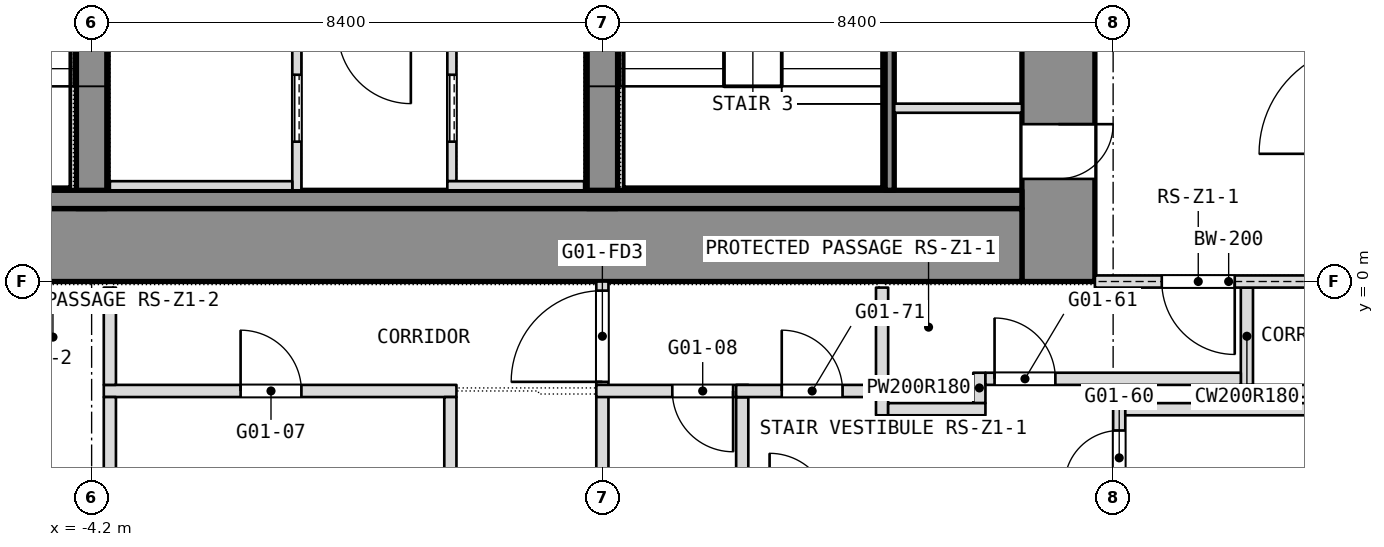
"""IFC4 building model, lengths in metres.
Left out: names, types, materials, properties, quantities, classifications, styles, units other than length and angle.
Written with IfcOpenShell. Run it as: python <this file> out.ifc"""

import sys

from ifc_helpers import new_model, si_unit, direction, frame, frame_2d, origin, place, context, subcontext, project, spatial, rectangle, extrude, element, fill, save


model = new_model("IFC4")
c1 = context("Model", 3, precision=1e-05, world=origin(), true_north=direction((0.0, 1.0)))
c2 = subcontext(c1, "Body", "Model", "MODEL_VIEW")
j1 = project(units=[si_unit("LENGTHUNIT", "METRE"), si_unit("PLANEANGLEUNIT", "RADIAN")], contexts=[c1])
p1 = place(None, origin())
s1 = spatial("IfcSite", under=j1, at=p1, CompositionType="ELEMENT")
p2 = place(p1, origin())
s2 = spatial("IfcBuilding", under=s1, at=p2, CompositionType="ELEMENT")
p3 = place(p2, frame((0.0, 0.0, 36.5)))
s3 = spatial("IfcBuildingStorey", under=s2, at=p3, CompositionType="ELEMENT", Elevation=36.5)
p4 = place(p3, frame((11.7, 0.0, 0.0), z_axis=(0.0, 0.0, 1.0), x_axis=(0.0, 1.0, 0.0)))
e1 = element("IfcWall", 1, at=p4, inside=s3, PredefinedType="SHEAR", context=c2, shape_type="SweptSolid", body=[
    extrude(rectangle(XDim=16.8, YDim=1.2, at=frame_2d((8.4, 0.0))), origin(), (0.0, 0.0, 1.0), 3.6),
])
p5 = place(p4, frame((1.688, 0.0, 0.0)))
e2 = element("IfcOpeningElement", 2, at=p5, cuts=e1, PredefinedType="OPENING", context=c2, shape_type="SweptSolid", body=[
    extrude(rectangle(XDim=0.9, YDim=2.1, at=frame_2d((0.45, 1.05))), frame((0.0, 0.6, 0.0), z_axis=(0.0, -1.0, 0.0), x_axis=(1.0, 0.0, 0.0)), (0.0, 0.0, 1.0), 1.2),
])
p6 = place(p4, frame((4.312, 0.0, 0.0)))
e3 = element("IfcOpeningElement", 3, at=p6, cuts=e1, PredefinedType="OPENING", context=c2, shape_type="SweptSolid", body=[
    extrude(rectangle(XDim=0.9, YDim=2.1, at=frame_2d((0.45, 1.05))), frame((0.0, 0.6, 0.0), z_axis=(0.0, -1.0, 0.0), x_axis=(1.0, 0.0, 0.0)), (0.0, 0.0, 1.0), 1.2),
])
p7 = place(p4, frame((6.825, 0.0, 0.0)))
e4 = element("IfcOpeningElement", 4, at=p7, cuts=e1, PredefinedType="OPENING", context=c2, shape_type="SweptSolid", body=[
    extrude(rectangle(XDim=1.2, YDim=2.1, at=frame_2d((0.6, 1.05))), frame((0.0, 0.6, 0.0), z_axis=(0.0, -1.0, 0.0), x_axis=(1.0, 0.0, 0.0)), (0.0, 0.0, 1.0), 1.2),
])
p8 = place(p4, frame((14.212, 0.0, 0.0)))
e5 = element("IfcOpeningElement", 5, at=p8, cuts=e1, PredefinedType="OPENING", context=c2, shape_type="SweptSolid", body=[
    extrude(rectangle(XDim=0.9, YDim=2.1, at=frame_2d((0.45, 1.05))), frame((0.0, 0.6, 0.0), z_axis=(0.0, -1.0, 0.0), x_axis=(1.0, 0.0, 0.0)), (0.0, 0.0, 1.0), 1.2),
])
p9 = place(p4, frame((11.587, 0.0, 0.0)))
e6 = element("IfcOpeningElement", 6, at=p9, cuts=e1, PredefinedType="OPENING", context=c2, shape_type="SweptSolid", body=[
    extrude(rectangle(XDim=0.9, YDim=2.1, at=frame_2d((0.45, 1.05))), frame((0.0, 0.6, 0.0), z_axis=(0.0, -1.0, 0.0), x_axis=(1.0, 0.0, 0.0)), (0.0, 0.0, 1.0), 1.2),
])
p10 = place(p4, frame((8.775, 0.0, 0.0)))
e7 = element("IfcOpeningElement", 7, at=p10, cuts=e1, PredefinedType="OPENING", context=c2, shape_type="SweptSolid", body=[
    extrude(rectangle(XDim=1.2, YDim=2.1, at=frame_2d((0.6, 1.05))), frame((0.0, 0.6, 0.0), z_axis=(0.0, -1.0, 0.0), x_axis=(1.0, 0.0, 0.0)), (0.0, 0.0, 1.0), 1.2),
])
p11 = place(p3, frame((-11.1, 0.6, 0.0), z_axis=(0.0, 0.0, 1.0), x_axis=(1.0, 0.0, 0.0)))
e8 = element("IfcWall", 8, at=p11, inside=s3, PredefinedType="SHEAR", context=c2, shape_type="SweptSolid", body=[
    extrude(rectangle(XDim=22.2, YDim=1.2, at=frame_2d((11.1, 0.0))), origin(), (0.0, 0.0, 1.0), 3.6),
])
p12 = place(p3, frame((-4.2, 1.2, 0.0), z_axis=(0.0, 0.0, 1.0), x_axis=(0.0, 1.0, 0.0)))
e9 = element("IfcWall", 9, at=p12, inside=s3, PredefinedType="SHEAR", context=c2, shape_type="SweptSolid", body=[
    extrude(rectangle(XDim=14.4, YDim=0.5, at=frame_2d((7.2, 0.0))), origin(), (0.0, 0.0, 1.0), 3.6),
])
p13 = place(p12, frame((8.1, 0.0, 0.0)))
e10 = element("IfcOpeningElement", 10, at=p13, cuts=e9, PredefinedType="OPENING", context=c2, shape_type="SweptSolid", body=[
    extrude(rectangle(XDim=1.2, YDim=2.1, at=frame_2d((0.6, 1.05))), frame((0.0, 0.25, 0.0), z_axis=(0.0, -1.0, 0.0), x_axis=(1.0, 0.0, 0.0)), (0.0, 0.0, 1.0), 0.5),
])
p14 = place(p3, frame((4.2, 1.2, 0.0), z_axis=(0.0, 0.0, 1.0), x_axis=(0.0, 1.0, 0.0)))
e11 = element("IfcWall", 11, at=p14, inside=s3, PredefinedType="SHEAR", context=c2, shape_type="SweptSolid", body=[
    extrude(rectangle(XDim=14.4, YDim=0.5, at=frame_2d((7.2, 0.0))), origin(), (0.0, 0.0, 1.0), 3.6),
])
p15 = place(p14, frame((5.55, 0.0, 0.0)))
e12 = element("IfcOpeningElement", 12, at=p15, cuts=e11, PredefinedType="OPENING", context=c2, shape_type="SweptSolid", body=[
    extrude(rectangle(XDim=1.2, YDim=2.1, at=frame_2d((0.6, 1.05))), frame((0.0, 0.25, 0.0), z_axis=(0.0, -1.0, 0.0), x_axis=(1.0, 0.0, 0.0)), (0.0, 0.0, 1.0), 0.5),
])
p16 = place(p3, frame((14.8, -1.7, 0.0), z_axis=(0.0, 0.0, 1.0), x_axis=(0.0, 1.0, 0.0)))
e13 = element("IfcWall", 13, at=p16, inside=s3, PredefinedType="PARTITIONING", context=c2, shape_type="SweptSolid", body=[
    extrude(rectangle(XDim=1.6, YDim=0.2, at=frame_2d((0.8, 0.0))), origin(), (0.0, 0.0, 1.0), 3.34),
])
p17 = place(p3, frame((12.7, -3.7, 0.0), z_axis=(0.0, 0.0, 1.0), x_axis=(0.0, 1.0, 0.0)))
e14 = element("IfcWall", 14, at=p17, inside=s3, PredefinedType="PARTITIONING", context=c2, shape_type="SweptSolid", body=[
    extrude(rectangle(XDim=1.7, YDim=0.2, at=frame_2d((0.85, 0.0))), origin(), (0.0, 0.0, 1.0), 3.34),
])
p18 = place(p17, frame((0.35, 0.0, 0.0)))
e15 = element("IfcOpeningElement", 15, at=p18, cuts=e14, PredefinedType="OPENING", context=c2, shape_type="SweptSolid", body=[
    extrude(rectangle(XDim=0.9, YDim=2.1, at=frame_2d((0.45, 1.05))), frame((0.0, 0.1, 0.0), z_axis=(0.0, -1.0, 0.0), x_axis=(1.0, 0.0, 0.0)), (0.0, 0.0, 1.0), 0.2),
])
p19 = place(p3, frame((10.4, -2.0, 0.0), z_axis=(0.0, 0.0, 1.0), x_axis=(0.0, 1.0, 0.0)))
e16 = element("IfcWall", 16, at=p19, inside=s3, PredefinedType="PARTITIONING", context=c2, shape_type="SweptSolid", body=[
    extrude(rectangle(XDim=0.5, YDim=0.2, at=frame_2d((0.25, 0.0))), origin(), (0.0, 0.0, 1.0), 3.34),
])
p20 = place(p3, frame((8.8, -2.2, 0.0), z_axis=(0.0, 0.0, 1.0), x_axis=(0.0, 1.0, 0.0)))
e17 = element("IfcWall", 17, at=p20, inside=s3, PredefinedType="PARTITIONING", context=c2, shape_type="SweptSolid", body=[
    extrude(rectangle(XDim=0.3, YDim=0.2, at=frame_2d((0.15, 0.0))), origin(), (0.0, 0.0, 1.0), 3.34),
])
p21 = place(p3, frame((8.8, -1.7, 0.0), z_axis=(0.0, 0.0, 1.0), x_axis=(0.0, 1.0, 0.0)))
e18 = element("IfcWall", 18, at=p21, inside=s3, PredefinedType="PARTITIONING", context=c2, shape_type="SweptSolid", body=[
    extrude(rectangle(XDim=1.6, YDim=0.2, at=frame_2d((0.8, 0.0))), origin(), (0.0, 0.0, 1.0), 3.34),
])
p22 = place(p3, frame((6.5, -3.7, 0.0), z_axis=(0.0, 0.0, 1.0), x_axis=(0.0, 1.0, 0.0)))
e19 = element("IfcWall", 19, at=p22, inside=s3, PredefinedType="PARTITIONING", context=c2, shape_type="SweptSolid", body=[
    extrude(rectangle(XDim=1.8, YDim=0.2, at=frame_2d((0.9, 0.0))), origin(), (0.0, 0.0, 1.0), 3.34),
])
p23 = place(p3, frame((4.2, -12.7, 0.0), z_axis=(0.0, 0.0, 1.0), x_axis=(0.0, 1.0, 0.0)))
e20 = element("IfcWall", 20, at=p23, inside=s3, PredefinedType="PARTITIONING", context=c2, shape_type="SweptSolid", body=[
    extrude(rectangle(XDim=12.7, YDim=0.2, at=frame_2d((6.35, 0.0))), origin(), (0.0, 0.0, 1.0), 3.34),
])
p24 = place(p23, frame((11.05, 0.0, 0.0)))
e21 = element("IfcOpeningElement", 21, at=p24, cuts=e20, PredefinedType="OPENING", context=c2, shape_type="SweptSolid", body=[
    extrude(rectangle(XDim=1.5, YDim=2.1, at=frame_2d((0.75, 1.05))), frame((0.0, 0.1, 0.0), z_axis=(0.0, -1.0, 0.0), x_axis=(1.0, 0.0, 0.0)), (0.0, 0.0, 1.0), 0.2),
])
p25 = place(p23, frame((0.225, 0.0, 0.0)))
e22 = element("IfcOpeningElement", 22, at=p25, cuts=e20, PredefinedType="OPENING", context=c2, shape_type="SweptSolid", body=[
    extrude(rectangle(XDim=1.5, YDim=2.1, at=frame_2d((0.75, 1.05))), frame((0.0, 0.1, 0.0), z_axis=(0.0, -1.0, 0.0), x_axis=(1.0, 0.0, 0.0)), (0.0, 0.0, 1.0), 0.2),
])
p26 = place(p3, frame((8.9, -2.1, 0.0), z_axis=(0.0, 0.0, 1.0), x_axis=(1.0, 0.0, 0.0)))
e23 = element("IfcWall", 23, at=p26, inside=s3, PredefinedType="PARTITIONING", context=c2, shape_type="SweptSolid", body=[
    extrude(rectangle(XDim=1.6, YDim=0.2, at=frame_2d((0.8, 0.0))), origin(), (0.0, 0.0, 1.0), 3.34),
])
p27 = place(p3, frame((12.8, -2.1, 0.0), z_axis=(0.0, 0.0, 1.0), x_axis=(1.0, 0.0, 0.0)))
e24 = element("IfcWall", 24, at=p27, inside=s3, PredefinedType="PARTITIONING", context=c2, shape_type="SweptSolid", body=[
    extrude(rectangle(XDim=4.1, YDim=0.2, at=frame_2d((2.05, 0.0))), origin(), (0.0, 0.0, 1.0), 3.34),
])
p28 = place(p3, frame((-4.0, -1.8, 0.0), z_axis=(0.0, 0.0, 1.0), x_axis=(1.0, 0.0, 0.0)))
e25 = element("IfcWall", 25, at=p28, inside=s3, PredefinedType="PARTITIONING", context=c2, shape_type="SweptSolid", body=[
    extrude(rectangle(XDim=5.8, YDim=0.2, at=frame_2d((2.9, 0.0))), origin(), (0.0, 0.0, 1.0), 3.34),
])
p29 = place(p28, frame((2.25, 0.0, 0.0)))
e26 = element("IfcOpeningElement", 26, at=p29, cuts=e25, PredefinedType="OPENING", context=c2, shape_type="SweptSolid", body=[
    extrude(rectangle(XDim=1.0, YDim=2.1, at=frame_2d((0.5, 1.05))), frame((0.0, 0.1, 0.0), z_axis=(0.0, -1.0, 0.0), x_axis=(1.0, 0.0, 0.0)), (0.0, 0.0, 1.0), 0.2),
])
p30 = place(p3, frame((4.1, -1.8, 0.0), z_axis=(0.0, 0.0, 1.0), x_axis=(1.0, 0.0, 0.0)))
e27 = element("IfcWall", 27, at=p30, inside=s3, PredefinedType="PARTITIONING", context=c2, shape_type="SweptSolid", body=[
    extrude(rectangle(XDim=2.5, YDim=0.2, at=frame_2d((1.25, 0.0))), origin(), (0.0, 0.0, 1.0), 3.34),
])
p31 = place(p30, frame((1.25, 0.0, 0.0)))
e28 = element("IfcOpeningElement", 28, at=p31, cuts=e27, PredefinedType="OPENING", context=c2, shape_type="SweptSolid", body=[
    extrude(rectangle(XDim=1.0, YDim=2.1, at=frame_2d((0.5, 1.05))), frame((0.0, 0.1, 0.0), z_axis=(0.0, -1.0, 0.0), x_axis=(1.0, 0.0, 0.0)), (0.0, 0.0, 1.0), 0.2),
])
p32 = place(p3, frame((6.4, -1.8, 0.0), z_axis=(0.0, 0.0, 1.0), x_axis=(1.0, 0.0, 0.0)))
e29 = element("IfcWall", 29, at=p32, inside=s3, PredefinedType="PARTITIONING", context=c2, shape_type="SweptSolid", body=[
    extrude(rectangle(XDim=2.5, YDim=0.2, at=frame_2d((1.25, 0.0))), origin(), (0.0, 0.0, 1.0), 3.34),
])
p33 = place(p32, frame((0.75, 0.0, 0.0)))
e30 = element("IfcOpeningElement", 30, at=p33, cuts=e29, PredefinedType="OPENING", context=c2, shape_type="SweptSolid", body=[
    extrude(rectangle(XDim=1.0, YDim=2.1, at=frame_2d((0.5, 1.05))), frame((0.0, 0.1, 0.0), z_axis=(0.0, -1.0, 0.0), x_axis=(1.0, 0.0, 0.0)), (0.0, 0.0, 1.0), 0.2),
])
p34 = place(p3, frame((14.8, -1.8, 0.0), z_axis=(0.0, 0.0, 1.0), x_axis=(1.0, 0.0, 0.0)))
e31 = element("IfcWall", 31, at=p34, inside=s3, PredefinedType="PARTITIONING", context=c2, shape_type="SweptSolid", body=[
    extrude(rectangle(XDim=2.1, YDim=0.2, at=frame_2d((1.05, 0.0))), origin(), (0.0, 0.0, 1.0), 3.34),
])
p35 = place(p3, frame((1.7, -10.7, 0.0), z_axis=(0.0, 0.0, 1.0), x_axis=(0.0, 1.0, 0.0)))
e32 = element("IfcWall", 32, at=p35, inside=s3, PredefinedType="PARTITIONING", context=c2, shape_type="SweptSolid", body=[
    extrude(rectangle(XDim=8.8, YDim=0.2, at=frame_2d((4.4, 0.0))), origin(), (0.0, 0.0, 1.0), 3.34),
])
p36 = place(p3, frame((10.5, -1.6, 0.0), z_axis=(0.0, 0.0, 1.0), x_axis=(1.0, 0.0, 0.0)))
e33 = element("IfcWall", 33, at=p36, inside=s3, PredefinedType="PARTITIONING", context=c2, shape_type="SweptSolid", body=[
    extrude(rectangle(XDim=4.2, YDim=0.2, at=frame_2d((2.1, 0.0))), origin(), (0.0, 0.0, 1.0), 3.34),
])
p37 = place(p36, frame((0.15, 0.0, 0.0)))
e34 = element("IfcOpeningElement", 34, at=p37, cuts=e33, PredefinedType="OPENING", context=c2, shape_type="SweptSolid", body=[
    extrude(rectangle(XDim=1.0, YDim=2.1, at=frame_2d((0.5, 1.05))), frame((0.0, 0.1, 0.0), z_axis=(0.0, -1.0, 0.0), x_axis=(1.0, 0.0, 0.0)), (0.0, 0.0, 1.0), 0.2),
])
p38 = place(p3, frame((-3.9, -3.5, 0.0), z_axis=(0.0, 0.0, 1.0), x_axis=(0.0, 1.0, 0.0)))
e35 = element("IfcWall", 35, at=p38, inside=s3, PredefinedType="PARTITIONING", context=c2, shape_type="SweptSolid", body=[
    extrude(rectangle(XDim=1.6, YDim=0.2, at=frame_2d((0.8, 0.0))), origin(), (0.0, 0.0, 1.0), 3.34),
])
p39 = place(p3, frame((-3.9, -1.7, 0.0), z_axis=(0.0, 0.0, 1.0), x_axis=(0.0, 1.0, 0.0)))
e36 = element("IfcWall", 36, at=p39, inside=s3, PredefinedType="PARTITIONING", context=c2, shape_type="SweptSolid", body=[
    extrude(rectangle(XDim=1.6, YDim=0.2, at=frame_2d((0.8, 0.0))), origin(), (0.0, 0.0, 1.0), 3.34),
])
p40 = place(p3, frame((-11.1, 1.35, 0.0), z_axis=(0.0, 0.0, 1.0), x_axis=(1.0, 0.0, 0.0)))
e37 = element("IfcWall", 37, at=p40, inside=s3, PredefinedType="PARTITIONING", context=c2, shape_type="SweptSolid", body=[
    extrude(rectangle(XDim=22.2, YDim=0.3, at=frame_2d((11.1, 0.0))), origin(), (0.0, 0.0, 1.0), 3.34),
])
p41 = place(p3, frame((8.925, 1.5, 0.0), z_axis=(0.0, 0.0, 1.0), x_axis=(0.0, 1.0, 0.0)))
e38 = element("IfcWall", 38, at=p41, inside=s3, PredefinedType="SHEAR", context=c2, shape_type="SweptSolid", body=[
    extrude(rectangle(XDim=6.6, YDim=0.15, at=frame_2d((3.3, 0.0))), origin(), (0.0, 0.0, 1.0), 3.34),
])
p42 = place(p41, frame((5.325, 0.0, 0.0)))
e39 = element("IfcOpeningElement", 39, at=p42, cuts=e38, PredefinedType="OPENING", context=c2, shape_type="SweptSolid", body=[
    extrude(rectangle(XDim=1.2, YDim=2.1, at=frame_2d((0.6, 1.05))), frame((0.0, 0.075, 0.0), z_axis=(0.0, -1.0, 0.0), x_axis=(1.0, 0.0, 0.0)), (0.0, 0.0, 1.0), 0.15),
])
p43 = place(p3, frame((9.0, 2.85, 0.0), z_axis=(0.0, 0.0, 1.0), x_axis=(1.0, 0.0, 0.0)))
e40 = element("IfcWall", 40, at=p43, inside=s3, PredefinedType="PARTITIONING", context=c2, shape_type="SweptSolid", body=[
    extrude(rectangle(XDim=2.1, YDim=0.15, at=frame_2d((1.05, 0.0))), origin(), (0.0, 0.0, 1.0), 3.34),
])
p44 = place(p3, frame((-0.825, 1.5, 0.0), z_axis=(0.0, 0.0, 1.0), x_axis=(0.0, 1.0, 0.0)))
e41 = element("IfcWall", 41, at=p44, inside=s3, PredefinedType="SHEAR", context=c2, shape_type="SweptSolid", body=[
    extrude(rectangle(XDim=2.55, YDim=0.15, at=frame_2d((1.275, 0.0))), origin(), (0.0, 0.0, 1.0), 3.6),
])
p45 = place(p44, frame((0.8, 0.0, 0.0)))
e42 = element("IfcOpeningElement", 42, at=p45, cuts=e41, PredefinedType="OPENING", context=c2, shape_type="SweptSolid", body=[
    extrude(rectangle(XDim=1.1, YDim=2.1, at=frame_2d((0.55, 1.05))), frame((0.0, 0.075, 0.0), z_axis=(0.0, -1.0, 0.0), x_axis=(1.0, 0.0, 0.0)), (0.0, 0.0, 1.0), 0.15),
])
p46 = place(p3, frame((-3.9, 1.575, 0.0), z_axis=(0.0, 0.0, 1.0), x_axis=(1.0, 0.0, 0.0)))
e43 = element("IfcWall", 43, at=p46, inside=s3, PredefinedType="SHEAR", context=c2, shape_type="SweptSolid", body=[
    extrude(rectangle(XDim=3.0, YDim=0.15, at=frame_2d((1.5, 0.0))), origin(), (0.0, 0.0, 1.0), 3.6),
])
p47 = place(p3, frame((1.725, 1.65, 0.0), z_axis=(0.0, 0.0, 1.0), x_axis=(0.0, 1.0, 0.0)))
e44 = element("IfcWall", 44, at=p47, inside=s3, PredefinedType="SHEAR", context=c2, shape_type="SweptSolid", body=[
    extrude(rectangle(XDim=2.4, YDim=0.15, at=frame_2d((1.2, 0.0))), origin(), (0.0, 0.0, 1.0), 3.6),
])
p48 = place(p47, frame((0.65, 0.0, 0.0)))
e45 = element("IfcOpeningElement", 45, at=p48, cuts=e44, PredefinedType="OPENING", context=c2, shape_type="SweptSolid", body=[
    extrude(rectangle(XDim=1.1, YDim=2.1, at=frame_2d((0.55, 1.05))), frame((0.0, 0.075, 0.0), z_axis=(0.0, -1.0, 0.0), x_axis=(1.0, 0.0, 0.0)), (0.0, 0.0, 1.0), 0.15),
])
p49 = place(p3, frame((1.65, 1.575, 0.0), z_axis=(0.0, 0.0, 1.0), x_axis=(1.0, 0.0, 0.0)))
e46 = element("IfcWall", 46, at=p49, inside=s3, PredefinedType="SHEAR", context=c2, shape_type="SweptSolid", body=[
    extrude(rectangle(XDim=2.25, YDim=0.15, at=frame_2d((1.125, 0.0))), origin(), (0.0, 0.0, 1.0), 3.6),
])
p50 = place(p3, frame((12.3, 0.0, 0.0), z_axis=(0.0, 0.0, 1.0), x_axis=(1.0, 0.0, 0.0)))
e47 = element("IfcWall", 47, at=p50, inside=s3, PredefinedType="PARTITIONING", context=c2, shape_type="SweptSolid", body=[
    extrude(rectangle(XDim=4.4, YDim=0.2, at=frame_2d((2.2, 0.0))), origin(), (0.0, 0.0, 1.0), 2.84),
])
p51 = place(p50, frame((1.1, 0.0, 0.0)))
e48 = element("IfcOpeningElement", 48, at=p51, cuts=e47, PredefinedType="OPENING", context=c2, shape_type="SweptSolid", body=[
    extrude(rectangle(XDim=1.2, YDim=2.1, at=frame_2d((0.6, 1.05))), frame((0.0, 0.1, 0.0), z_axis=(0.0, -1.0, 0.0), x_axis=(1.0, 0.0, 0.0)), (0.0, 0.0, 1.0), 0.2),
])
p52 = place(p18, origin())
e49 = element("IfcDoor", 49, at=p52, inside=s3, OperationType="SINGLE_SWING_LEFT", PredefinedType="DOOR", context=c2, shape_type="SweptSolid", body=[
    extrude(rectangle(XDim=0.9, YDim=2.1, at=frame_2d((0.45, 1.05))), frame((0.0, 0.025, 0.0), z_axis=(0.0, -1.0, 0.0), x_axis=(1.0, 0.0, 0.0)), (0.0, 0.0, 1.0), 0.05),
])
fill(e15, e49)
p53 = place(p29, origin())
e50 = element("IfcDoor", 50, at=p53, inside=s3, OperationType="SINGLE_SWING_LEFT", PredefinedType="DOOR", context=c2, shape_type="SweptSolid", body=[
    extrude(rectangle(XDim=1.0, YDim=2.1, at=frame_2d((0.5, 1.05))), frame((0.0, 0.025, 0.0), z_axis=(0.0, -1.0, 0.0), x_axis=(1.0, 0.0, 0.0)), (0.0, 0.0, 1.0), 0.05),
])
fill(e26, e50)
p54 = place(p31, origin())
e51 = element("IfcDoor", 51, at=p54, inside=s3, OperationType="SINGLE_SWING_RIGHT", PredefinedType="DOOR", context=c2, shape_type="SweptSolid", body=[
    extrude(rectangle(XDim=1.0, YDim=2.1, at=frame_2d((0.5, 1.05))), frame((0.0, 0.025, 0.0), z_axis=(0.0, -1.0, 0.0), x_axis=(1.0, 0.0, 0.0)), (0.0, 0.0, 1.0), 0.05),
])
fill(e28, e51)
p55 = place(p33, origin())
e52 = element("IfcDoor", 52, at=p55, inside=s3, OperationType="SINGLE_SWING_LEFT", PredefinedType="DOOR", context=c2, shape_type="SweptSolid", body=[
    extrude(rectangle(XDim=1.0, YDim=2.1, at=frame_2d((0.5, 1.05))), frame((0.0, 0.025, 0.0), z_axis=(0.0, -1.0, 0.0), x_axis=(1.0, 0.0, 0.0)), (0.0, 0.0, 1.0), 0.05),
])
fill(e30, e52)
p56 = place(p37, origin())
e53 = element("IfcDoor", 53, at=p56, inside=s3, OperationType="SINGLE_SWING_LEFT", PredefinedType="DOOR", context=c2, shape_type="SweptSolid", body=[
    extrude(rectangle(XDim=1.0, YDim=2.1, at=frame_2d((0.5, 1.05))), frame((0.0, 0.025, 0.0), z_axis=(0.0, -1.0, 0.0), x_axis=(1.0, 0.0, 0.0)), (0.0, 0.0, 1.0), 0.05),
])
fill(e34, e53)
p57 = place(p5, origin())
e54 = element("IfcDoor", 54, at=p57, inside=s3, OperationType="SINGLE_SWING_LEFT", PredefinedType="DOOR", context=c2, shape_type="SweptSolid", body=[
    extrude(rectangle(XDim=0.9, YDim=2.1, at=frame_2d((0.45, 1.05))), frame((0.0, 0.025, 0.0), z_axis=(0.0, -1.0, 0.0), x_axis=(1.0, 0.0, 0.0)), (0.0, 0.0, 1.0), 0.05),
])
fill(e2, e54)
p58 = place(p45, origin())
e55 = element("IfcDoor", 55, at=p58, inside=s3, OperationType="SLIDING_TO_LEFT", PredefinedType="DOOR", context=c2, shape_type="SweptSolid", body=[
    extrude(rectangle(XDim=1.1, YDim=2.1, at=frame_2d((0.55, 1.05))), frame((0.0, 0.025, 0.0), z_axis=(0.0, -1.0, 0.0), x_axis=(1.0, 0.0, 0.0)), (0.0, 0.0, 1.0), 0.05),
])
fill(e42, e55)
p59 = place(p48, origin())
e56 = element("IfcDoor", 56, at=p59, inside=s3, OperationType="SLIDING_TO_LEFT", PredefinedType="DOOR", context=c2, shape_type="SweptSolid", body=[
    extrude(rectangle(XDim=1.1, YDim=2.1, at=frame_2d((0.55, 1.05))), frame((0.0, 0.025, 0.0), z_axis=(0.0, -1.0, 0.0), x_axis=(1.0, 0.0, 0.0)), (0.0, 0.0, 1.0), 0.05),
])
fill(e45, e56)
p60 = place(p51, origin())
e57 = element("IfcDoor", 57, at=p60, inside=s3, OperationType="SINGLE_SWING_LEFT", PredefinedType="DOOR", context=c2, shape_type="SweptSolid", body=[
    extrude(rectangle(XDim=1.2, YDim=2.1, at=frame_2d((0.6, 1.05))), frame((0.0, 0.025, 0.0), z_axis=(0.0, -1.0, 0.0), x_axis=(1.0, 0.0, 0.0)), (0.0, 0.0, 1.0), 0.05),
])
fill(e48, e57)
p61 = place(p24, origin())
e58 = element("IfcDoor", 58, at=p61, inside=s3, OperationType="DOUBLE_DOOR_DOUBLE_SWING", PredefinedType="DOOR", context=c2, shape_type="SweptSolid", body=[
    extrude(rectangle(XDim=1.5, YDim=2.1, at=frame_2d((0.75, 1.05))), frame((0.0, 0.025, 0.0), z_axis=(0.0, -1.0, 0.0), x_axis=(1.0, 0.0, 0.0)), (0.0, 0.0, 1.0), 0.05),
])
fill(e21, e58)
save(model, sys.argv[1])
